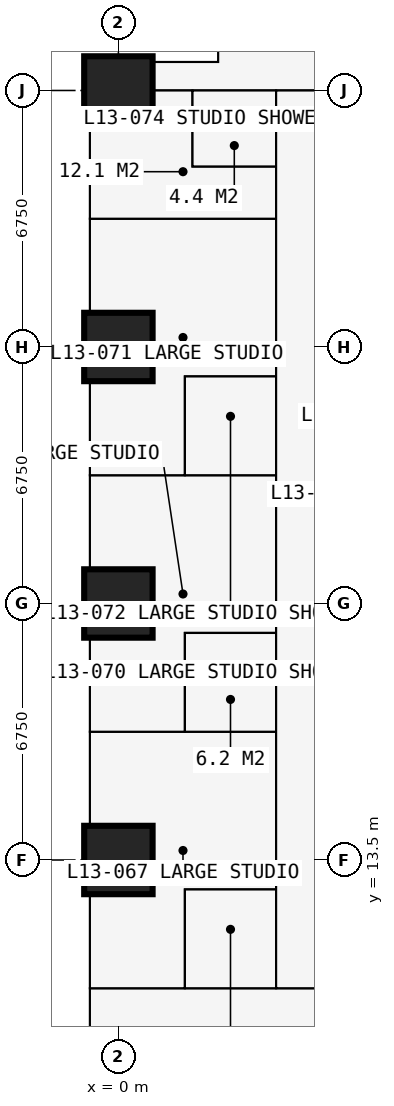
"""IFC4 building model, lengths in metres.
Left out: names, types, materials, properties, quantities, classifications, styles, units other than length and angle.
Written with IfcOpenShell. Run it as: python <this file> out.ifc"""

import sys

from ifc_helpers import new_model, si_unit, direction, frame, frame_2d, origin, origin_2d, place, context, subcontext, project, spatial, rectangle, extrude, element, fill, save


model = new_model("IFC4")
c1 = context("Model", 3, precision=1e-05, world=origin(), true_north=direction((0.0, 1.0)))
c2 = subcontext(c1, "Body", "Model", "MODEL_VIEW")
j1 = project(units=[si_unit("LENGTHUNIT", "METRE"), si_unit("PLANEANGLEUNIT", "RADIAN")], contexts=[c1])
p1 = place(None, origin())
s1 = spatial("IfcSite", under=j1, at=p1, CompositionType="ELEMENT")
p2 = place(p1, origin())
s2 = spatial("IfcBuilding", under=s1, at=p2, CompositionType="ELEMENT")
p3 = place(p2, frame((0.0, 0.0, 50.4)))
s3 = spatial("IfcBuildingStorey", under=s2, at=p3, CompositionType="ELEMENT", Elevation=50.4)
for number, where, z_axis, x_axis in (
    (1, (0.0, 13.5, 0.0), (0.0, 0.0, 1.0), (1.0, 0.0, 0.0)),
    (2, (0.0, 20.25, 0.0), (0.0, 0.0, 1.0), (1.0, 0.0, 0.0)),
    (3, (0.0, 27.0, 0.0), (0.0, 0.0, 1.0), (1.0, 0.0, 0.0)),
    (4, (0.0, 33.75, 0.0), (0.0, 0.0, 1.0), (1.0, 0.0, 0.0)),
):
    element("IfcColumn", number, at=place(p3, frame(where, z_axis=z_axis, x_axis=x_axis)), inside=s3, PredefinedType="COLUMN", context=c2, shape_type="SweptSolid", body=[
        extrude(rectangle(XDim=1.8, YDim=1.8, at=origin_2d()), origin(), (0.0, 0.0, 1.0), 3.6),
    ])
p4 = place(p3, frame((2.625, 37.875, 0.0), z_axis=(0.0, 0.0, 1.0), x_axis=(0.0, -1.0, 0.0)))
e5 = element("IfcWall", 5, at=p4, inside=s3, PredefinedType="SOLIDWALL", context=c2, shape_type="SweptSolid", body=[
    extrude(rectangle(XDim=3.375, YDim=0.3, at=frame_2d((1.688, 0.0))), origin(), (0.0, 0.0, 1.0), 3.375),
])
p5 = place(p4, frame((0.788, 0.0, 0.6)))
e6 = element("IfcOpeningElement", 6, at=p5, cuts=e5, PredefinedType="OPENING", context=c2, shape_type="SweptSolid", body=[
    extrude(rectangle(XDim=1.8, YDim=2.1, at=frame_2d((0.9, 1.05))), frame((0.0, 0.16, 0.0), z_axis=(0.0, -1.0, 0.0), x_axis=(1.0, 0.0, 0.0)), (0.0, 0.0, 1.0), 0.32),
])
p6 = place(p3, frame((2.625, 34.5, 0.0), z_axis=(0.0, 0.0, 1.0), x_axis=(-1.0, 0.0, 0.0)))
e7 = element("IfcWall", 7, at=p6, inside=s3, PredefinedType="SOLIDWALL", context=c2, shape_type="SweptSolid", body=[
    extrude(rectangle(XDim=3.375, YDim=0.3, at=frame_2d((1.688, 0.0))), origin(), (0.0, 0.0, 1.0), 3.375),
])
p7 = place(p6, frame((0.343, 0.0, 0.9)))
e8 = element("IfcOpeningElement", 8, at=p7, cuts=e7, PredefinedType="OPENING", context=c2, shape_type="SweptSolid", body=[
    extrude(rectangle(XDim=1.2, YDim=1.8, at=frame_2d((0.6, 0.9))), frame((0.0, 0.16, 0.0), z_axis=(0.0, -1.0, 0.0), x_axis=(1.0, 0.0, 0.0)), (0.0, 0.0, 1.0), 0.32),
])
p8 = place(p3, frame((-0.75, 20.25, 0.0), z_axis=(0.0, 0.0, 1.0), x_axis=(0.0, 1.0, 0.0)))
e9 = element("IfcWall", 9, at=p8, inside=s3, PredefinedType="SOLIDWALL", context=c2, shape_type="SweptSolid", body=[
    extrude(rectangle(XDim=6.75, YDim=0.15, at=frame_2d((3.375, 0.0))), origin(), (0.0, 0.0, 1.0), 3.375),
])
p9 = place(p8, frame((0.962, 0.0, 0.0)))
e10 = element("IfcOpeningElement", 10, at=p9, cuts=e9, PredefinedType="OPENING", context=c2, shape_type="SweptSolid", body=[
    extrude(rectangle(XDim=1.0, YDim=2.2, at=frame_2d((0.5, 1.1))), frame((0.0, 0.085, 0.0), z_axis=(0.0, -1.0, 0.0), x_axis=(1.0, 0.0, 0.0)), (0.0, 0.0, 1.0), 0.17),
])
p10 = place(p8, frame((2.025, 0.0, 0.9)))
e11 = element("IfcOpeningElement", 11, at=p10, cuts=e9, PredefinedType="OPENING", context=c2, shape_type="SweptSolid", body=[
    extrude(rectangle(XDim=1.2, YDim=1.8, at=frame_2d((0.6, 0.9))), frame((0.0, 0.085, 0.0), z_axis=(0.0, -1.0, 0.0), x_axis=(1.0, 0.0, 0.0)), (0.0, 0.0, 1.0), 0.17),
])
p11 = place(p8, frame((4.788, 0.0, 0.0)))
e12 = element("IfcOpeningElement", 12, at=p11, cuts=e9, PredefinedType="OPENING", context=c2, shape_type="SweptSolid", body=[
    extrude(rectangle(XDim=1.0, YDim=2.2, at=frame_2d((0.5, 1.1))), frame((0.0, 0.085, 0.0), z_axis=(0.0, -1.0, 0.0), x_axis=(1.0, 0.0, 0.0)), (0.0, 0.0, 1.0), 0.17),
])
p12 = place(p8, frame((3.525, 0.0, 0.9)))
e13 = element("IfcOpeningElement", 13, at=p12, cuts=e9, PredefinedType="OPENING", context=c2, shape_type="SweptSolid", body=[
    extrude(rectangle(XDim=1.2, YDim=1.8, at=frame_2d((0.6, 0.9))), frame((0.0, 0.085, 0.0), z_axis=(0.0, -1.0, 0.0), x_axis=(1.0, 0.0, 0.0)), (0.0, 0.0, 1.0), 0.17),
])
p13 = place(p3, frame((-0.85, 23.625, 0.0), z_axis=(0.0, 0.0, 1.0), x_axis=(-1.0, 0.0, 0.0)))
e14 = element("IfcWall", 14, at=p13, inside=s3, PredefinedType="USERDEFINED", context=c2, shape_type="SweptSolid", body=[
    extrude(rectangle(XDim=2.2, YDim=1.0, at=frame_2d((1.1, 0.0))), origin(), (0.0, 0.0, 1.0), 0.9),
])
p14 = place(p3, frame((-0.734, 10.125, 0.0), z_axis=(0.0, 0.0, 1.0), x_axis=(1.0, 0.0, 0.0)))
e15 = element("IfcWall", 15, at=p14, inside=s3, PredefinedType="PARTITIONING", context=c2, shape_type="SweptSolid", body=[
    extrude(rectangle(XDim=10.859, YDim=0.15, at=frame_2d((5.429, 0.0))), origin(), (0.0, 0.0, 1.0), 3.375),
])
p15 = place(p14, frame((5.134, 0.0, 0.0)))
e16 = element("IfcOpeningElement", 16, at=p15, cuts=e15, PredefinedType="OPENING", context=c2, shape_type="SweptSolid", body=[
    extrude(rectangle(XDim=1.0, YDim=2.2, at=frame_2d((0.5, 1.1))), frame((0.0, 0.085, 0.0), z_axis=(0.0, -1.0, 0.0), x_axis=(1.0, 0.0, 0.0)), (0.0, 0.0, 1.0), 0.17),
])
p16 = place(p3, frame((-0.734, 16.875, 0.0), z_axis=(0.0, 0.0, 1.0), x_axis=(1.0, 0.0, 0.0)))
e17 = element("IfcWall", 17, at=p16, inside=s3, PredefinedType="PARTITIONING", context=c2, shape_type="SweptSolid", body=[
    extrude(rectangle(XDim=4.884, YDim=0.175, at=frame_2d((2.442, 0.0))), origin(), (0.0, 0.0, 1.0), 3.375),
])
p17 = place(p16, frame((3.234, 0.0, 0.0)))
e18 = element("IfcOpeningElement", 18, at=p17, cuts=e17, PredefinedType="OPENING", context=c2, shape_type="SweptSolid", body=[
    extrude(rectangle(XDim=0.9, YDim=2.2, at=frame_2d((0.45, 1.1))), frame((0.0, 0.097, 0.0), z_axis=(0.0, -1.0, 0.0), x_axis=(1.0, 0.0, 0.0)), (0.0, 0.0, 1.0), 0.195),
])
p18 = place(p3, frame((-0.734, 23.625, 0.0), z_axis=(0.0, 0.0, 1.0), x_axis=(1.0, 0.0, 0.0)))
e19 = element("IfcWall", 19, at=p18, inside=s3, PredefinedType="PARTITIONING", context=c2, shape_type="SweptSolid", body=[
    extrude(rectangle(XDim=4.884, YDim=0.175, at=frame_2d((2.442, 0.0))), origin(), (0.0, 0.0, 1.0), 3.375),
])
p19 = place(p18, frame((3.234, 0.0, 0.0)))
e20 = element("IfcOpeningElement", 20, at=p19, cuts=e19, PredefinedType="OPENING", context=c2, shape_type="SweptSolid", body=[
    extrude(rectangle(XDim=0.9, YDim=2.2, at=frame_2d((0.45, 1.1))), frame((0.0, 0.097, 0.0), z_axis=(0.0, -1.0, 0.0), x_axis=(1.0, 0.0, 0.0)), (0.0, 0.0, 1.0), 0.195),
])
p20 = place(p3, frame((-0.734, 30.375, 0.0), z_axis=(0.0, 0.0, 1.0), x_axis=(1.0, 0.0, 0.0)))
e21 = element("IfcWall", 21, at=p20, inside=s3, PredefinedType="PARTITIONING", context=c2, shape_type="SweptSolid", body=[
    extrude(rectangle(XDim=4.884, YDim=0.175, at=frame_2d((2.442, 0.0))), origin(), (0.0, 0.0, 1.0), 3.375),
])
p21 = place(p3, frame((-0.734, 33.75, 0.0), z_axis=(0.0, 0.0, 1.0), x_axis=(1.0, 0.0, 0.0)))
e22 = element("IfcWall", 22, at=p21, inside=s3, PredefinedType="PARTITIONING", context=c2, shape_type="SweptSolid", body=[
    extrude(rectangle(XDim=10.859, YDim=0.15, at=frame_2d((5.429, 0.0))), origin(), (0.0, 0.0, 1.0), 2.877),
])
p22 = place(p3, frame((1.75, 10.125, 0.0), z_axis=(0.0, 0.0, 1.0), x_axis=(0.0, 1.0, 0.0)))
e23 = element("IfcWall", 23, at=p22, inside=s3, PredefinedType="PARTITIONING", context=c2, shape_type="SweptSolid", body=[
    extrude(rectangle(XDim=2.6, YDim=0.1, at=frame_2d((1.3, 0.0))), origin(), (0.0, 0.0, 1.0), 3.375),
])
p23 = place(p22, frame((0.85, 0.0, 0.0)))
e24 = element("IfcOpeningElement", 24, at=p23, cuts=e23, PredefinedType="OPENING", context=c2, shape_type="SweptSolid", body=[
    extrude(rectangle(XDim=0.9, YDim=2.2, at=frame_2d((0.45, 1.1))), frame((0.0, 0.06, 0.0), z_axis=(0.0, -1.0, 0.0), x_axis=(1.0, 0.0, 0.0)), (0.0, 0.0, 1.0), 0.12),
])
p24 = place(p3, frame((1.75, 12.725, 0.0), z_axis=(0.0, 0.0, 1.0), x_axis=(1.0, 0.0, 0.0)))
e25 = element("IfcWall", 25, at=p24, inside=s3, PredefinedType="PARTITIONING", context=c2, shape_type="SweptSolid", body=[
    extrude(rectangle(XDim=2.4, YDim=0.1, at=frame_2d((1.2, 0.0))), origin(), (0.0, 0.0, 1.0), 3.375),
])
p25 = place(p3, frame((1.75, 16.875, 0.0), z_axis=(0.0, 0.0, 1.0), x_axis=(0.0, 1.0, 0.0)))
e26 = element("IfcWall", 26, at=p25, inside=s3, PredefinedType="PARTITIONING", context=c2, shape_type="SweptSolid", body=[
    extrude(rectangle(XDim=2.6, YDim=0.1, at=frame_2d((1.3, 0.0))), origin(), (0.0, 0.0, 1.0), 3.375),
])
p26 = place(p3, frame((1.75, 19.475, 0.0), z_axis=(0.0, 0.0, 1.0), x_axis=(1.0, 0.0, 0.0)))
e27 = element("IfcWall", 27, at=p26, inside=s3, PredefinedType="PARTITIONING", context=c2, shape_type="SweptSolid", body=[
    extrude(rectangle(XDim=2.4, YDim=0.1, at=frame_2d((1.2, 0.0))), origin(), (0.0, 0.0, 1.0), 3.375),
])
p27 = place(p3, frame((1.75, 23.625, 0.0), z_axis=(0.0, 0.0, 1.0), x_axis=(0.0, 1.0, 0.0)))
e28 = element("IfcWall", 28, at=p27, inside=s3, PredefinedType="PARTITIONING", context=c2, shape_type="SweptSolid", body=[
    extrude(rectangle(XDim=2.6, YDim=0.1, at=frame_2d((1.3, 0.0))), origin(), (0.0, 0.0, 1.0), 3.375),
])
p28 = place(p3, frame((1.75, 26.225, 0.0), z_axis=(0.0, 0.0, 1.0), x_axis=(1.0, 0.0, 0.0)))
e29 = element("IfcWall", 29, at=p28, inside=s3, PredefinedType="PARTITIONING", context=c2, shape_type="SweptSolid", body=[
    extrude(rectangle(XDim=2.4, YDim=0.1, at=frame_2d((1.2, 0.0))), origin(), (0.0, 0.0, 1.0), 3.375),
])
p29 = place(p3, frame((1.95, 31.75, 0.0), z_axis=(0.0, 0.0, 1.0), x_axis=(0.0, 1.0, 0.0)))
e30 = element("IfcWall", 30, at=p29, inside=s3, PredefinedType="PARTITIONING", context=c2, shape_type="SweptSolid", body=[
    extrude(rectangle(XDim=2.0, YDim=0.1, at=frame_2d((1.0, 0.0))), origin(), (0.0, 0.0, 1.0), 3.375),
])
p30 = place(p3, frame((1.95, 31.75, 0.0), z_axis=(0.0, 0.0, 1.0), x_axis=(1.0, 0.0, 0.0)))
e31 = element("IfcWall", 31, at=p30, inside=s3, PredefinedType="PARTITIONING", context=c2, shape_type="SweptSolid", body=[
    extrude(rectangle(XDim=2.2, YDim=0.1, at=frame_2d((1.1, 0.0))), origin(), (0.0, 0.0, 1.0), 3.375),
])
p31 = place(p30, frame((0.65, 0.0, 0.0)))
e32 = element("IfcOpeningElement", 32, at=p31, cuts=e31, PredefinedType="OPENING", context=c2, shape_type="SweptSolid", body=[
    extrude(rectangle(XDim=0.9, YDim=2.2, at=frame_2d((0.45, 1.1))), frame((0.0, 0.06, 0.0), z_axis=(0.0, -1.0, 0.0), x_axis=(1.0, 0.0, 0.0)), (0.0, 0.0, 1.0), 0.12),
])
p32 = place(p3, frame((4.15, 10.125, 0.0), z_axis=(0.0, 0.0, 1.0), x_axis=(0.0, 1.0, 0.0)))
e33 = element("IfcWall", 33, at=p32, inside=s3, PredefinedType="PARTITIONING", context=c2, shape_type="SweptSolid", body=[
    extrude(rectangle(XDim=23.625, YDim=0.15, at=frame_2d((11.812, 0.0))), origin(), (0.0, 0.0, 1.0), 3.375),
])
p33 = place(p32, frame((4.2, 0.0, 0.0)))
e34 = element("IfcOpeningElement", 34, at=p33, cuts=e33, PredefinedType="OPENING", context=c2, shape_type="SweptSolid", body=[
    extrude(rectangle(XDim=0.95, YDim=2.2, at=frame_2d((0.475, 1.1))), frame((0.0, 0.085, 0.0), z_axis=(0.0, -1.0, 0.0), x_axis=(1.0, 0.0, 0.0)), (0.0, 0.0, 1.0), 0.17),
])
p34 = place(p32, frame((10.95, 0.0, 0.0)))
e35 = element("IfcOpeningElement", 35, at=p34, cuts=e33, PredefinedType="OPENING", context=c2, shape_type="SweptSolid", body=[
    extrude(rectangle(XDim=0.95, YDim=2.2, at=frame_2d((0.475, 1.1))), frame((0.0, 0.085, 0.0), z_axis=(0.0, -1.0, 0.0), x_axis=(1.0, 0.0, 0.0)), (0.0, 0.0, 1.0), 0.17),
])
p35 = place(p32, frame((17.7, 0.0, 0.0)))
e36 = element("IfcOpeningElement", 36, at=p35, cuts=e33, PredefinedType="OPENING", context=c2, shape_type="SweptSolid", body=[
    extrude(rectangle(XDim=0.95, YDim=2.2, at=frame_2d((0.475, 1.1))), frame((0.0, 0.085, 0.0), z_axis=(0.0, -1.0, 0.0), x_axis=(1.0, 0.0, 0.0)), (0.0, 0.0, 1.0), 0.17),
])
p36 = place(p32, frame((20.5, 0.0, 0.0)))
e37 = element("IfcOpeningElement", 37, at=p36, cuts=e33, PredefinedType="OPENING", context=c2, shape_type="SweptSolid", body=[
    extrude(rectangle(XDim=0.95, YDim=2.2, at=frame_2d((0.475, 1.1))), frame((0.0, 0.085, 0.0), z_axis=(0.0, -1.0, 0.0), x_axis=(1.0, 0.0, 0.0)), (0.0, 0.0, 1.0), 0.17),
])
p37 = place(p7, origin())
e38 = element("IfcWindow", 38, at=p37, inside=s3, PartitioningType="SINGLE_PANEL", PredefinedType="WINDOW", context=c2, shape_type="SweptSolid", body=[
    extrude(rectangle(XDim=1.2, YDim=1.8, at=frame_2d((0.6, 0.9))), frame((0.0, 0.03, 0.0), z_axis=(0.0, -1.0, 0.0), x_axis=(1.0, 0.0, 0.0)), (0.0, 0.0, 1.0), 0.06),
])
fill(e8, e38)
p38 = place(p9, origin())
e39 = element("IfcDoor", 39, at=p38, inside=s3, OperationType="SINGLE_SWING_LEFT", PredefinedType="DOOR", context=c2, shape_type="SweptSolid", body=[
    extrude(rectangle(XDim=1.0, YDim=2.2, at=frame_2d((0.5, 1.1))), frame((0.0, 0.025, 0.0), z_axis=(0.0, -1.0, 0.0), x_axis=(1.0, 0.0, 0.0)), (0.0, 0.0, 1.0), 0.05),
])
fill(e10, e39)
p39 = place(p10, origin())
e40 = element("IfcWindow", 40, at=p39, inside=s3, PartitioningType="SINGLE_PANEL", PredefinedType="WINDOW", context=c2, shape_type="SweptSolid", body=[
    extrude(rectangle(XDim=1.2, YDim=1.8, at=frame_2d((0.6, 0.9))), frame((0.0, 0.03, 0.0), z_axis=(0.0, -1.0, 0.0), x_axis=(1.0, 0.0, 0.0)), (0.0, 0.0, 1.0), 0.06),
])
fill(e11, e40)
p40 = place(p11, origin())
e41 = element("IfcDoor", 41, at=p40, inside=s3, OperationType="SINGLE_SWING_RIGHT", PredefinedType="DOOR", context=c2, shape_type="SweptSolid", body=[
    extrude(rectangle(XDim=1.0, YDim=2.2, at=frame_2d((0.5, 1.1))), frame((0.0, 0.025, 0.0), z_axis=(0.0, -1.0, 0.0), x_axis=(1.0, 0.0, 0.0)), (0.0, 0.0, 1.0), 0.05),
])
fill(e12, e41)
p41 = place(p12, origin())
e42 = element("IfcWindow", 42, at=p41, inside=s3, PartitioningType="SINGLE_PANEL", PredefinedType="WINDOW", context=c2, shape_type="SweptSolid", body=[
    extrude(rectangle(XDim=1.2, YDim=1.8, at=frame_2d((0.6, 0.9))), frame((0.0, 0.03, 0.0), z_axis=(0.0, -1.0, 0.0), x_axis=(1.0, 0.0, 0.0)), (0.0, 0.0, 1.0), 0.06),
])
fill(e13, e42)
p42 = place(p15, origin())
e43 = element("IfcDoor", 43, at=p42, inside=s3, OperationType="SINGLE_SWING_LEFT", PredefinedType="DOOR", context=c2, shape_type="SweptSolid", body=[
    extrude(rectangle(XDim=1.0, YDim=2.2, at=frame_2d((0.5, 1.1))), frame((0.0, 0.025, 0.0), z_axis=(0.0, -1.0, 0.0), x_axis=(1.0, 0.0, 0.0)), (0.0, 0.0, 1.0), 0.05),
])
fill(e16, e43)
p43 = place(p33, origin())
e44 = element("IfcDoor", 44, at=p43, inside=s3, OperationType="SINGLE_SWING_LEFT", PredefinedType="DOOR", context=c2, shape_type="SweptSolid", body=[
    extrude(rectangle(XDim=0.95, YDim=2.2, at=frame_2d((0.475, 1.1))), frame((0.0, 0.025, 0.0), z_axis=(0.0, -1.0, 0.0), x_axis=(1.0, 0.0, 0.0)), (0.0, 0.0, 1.0), 0.05),
])
fill(e34, e44)
p44 = place(p23, origin())
e45 = element("IfcDoor", 45, at=p44, inside=s3, OperationType="SINGLE_SWING_RIGHT", PredefinedType="DOOR", context=c2, shape_type="SweptSolid", body=[
    extrude(rectangle(XDim=0.9, YDim=2.2, at=frame_2d((0.45, 1.1))), frame((0.0, 0.025, 0.0), z_axis=(0.0, -1.0, 0.0), x_axis=(1.0, 0.0, 0.0)), (0.0, 0.0, 1.0), 0.05),
])
fill(e24, e45)
p45 = place(p34, origin())
e46 = element("IfcDoor", 46, at=p45, inside=s3, OperationType="SINGLE_SWING_LEFT", PredefinedType="DOOR", context=c2, shape_type="SweptSolid", body=[
    extrude(rectangle(XDim=0.95, YDim=2.2, at=frame_2d((0.475, 1.1))), frame((0.0, 0.025, 0.0), z_axis=(0.0, -1.0, 0.0), x_axis=(1.0, 0.0, 0.0)), (0.0, 0.0, 1.0), 0.05),
])
fill(e35, e46)
p46 = place(p17, origin())
e47 = element("IfcDoor", 47, at=p46, inside=s3, OperationType="SINGLE_SWING_RIGHT", PredefinedType="DOOR", context=c2, shape_type="SweptSolid", body=[
    extrude(rectangle(XDim=0.9, YDim=2.2, at=frame_2d((0.45, 1.1))), frame((0.0, 0.025, 0.0), z_axis=(0.0, -1.0, 0.0), x_axis=(1.0, 0.0, 0.0)), (0.0, 0.0, 1.0), 0.05),
])
fill(e18, e47)
p47 = place(p35, origin())
e48 = element("IfcDoor", 48, at=p47, inside=s3, OperationType="SINGLE_SWING_LEFT", PredefinedType="DOOR", context=c2, shape_type="SweptSolid", body=[
    extrude(rectangle(XDim=0.95, YDim=2.2, at=frame_2d((0.475, 1.1))), frame((0.0, 0.025, 0.0), z_axis=(0.0, -1.0, 0.0), x_axis=(1.0, 0.0, 0.0)), (0.0, 0.0, 1.0), 0.05),
])
fill(e36, e48)
p48 = place(p19, origin())
e49 = element("IfcDoor", 49, at=p48, inside=s3, OperationType="SINGLE_SWING_RIGHT", PredefinedType="DOOR", context=c2, shape_type="SweptSolid", body=[
    extrude(rectangle(XDim=0.9, YDim=2.2, at=frame_2d((0.45, 1.1))), frame((0.0, 0.025, 0.0), z_axis=(0.0, -1.0, 0.0), x_axis=(1.0, 0.0, 0.0)), (0.0, 0.0, 1.0), 0.05),
])
fill(e20, e49)
p49 = place(p36, origin())
e50 = element("IfcDoor", 50, at=p49, inside=s3, OperationType="SINGLE_SWING_LEFT", PredefinedType="DOOR", context=c2, shape_type="SweptSolid", body=[
    extrude(rectangle(XDim=0.95, YDim=2.2, at=frame_2d((0.475, 1.1))), frame((0.0, 0.025, 0.0), z_axis=(0.0, -1.0, 0.0), x_axis=(1.0, 0.0, 0.0)), (0.0, 0.0, 1.0), 0.05),
])
fill(e37, e50)
p50 = place(p31, origin())
e51 = element("IfcDoor", 51, at=p50, inside=s3, OperationType="SINGLE_SWING_RIGHT", PredefinedType="DOOR", context=c2, shape_type="SweptSolid", body=[
    extrude(rectangle(XDim=0.9, YDim=2.2, at=frame_2d((0.45, 1.1))), frame((0.0, 0.025, 0.0), z_axis=(0.0, -1.0, 0.0), x_axis=(1.0, 0.0, 0.0)), (0.0, 0.0, 1.0), 0.05),
])
fill(e32, e51)
save(model, sys.argv[1])
